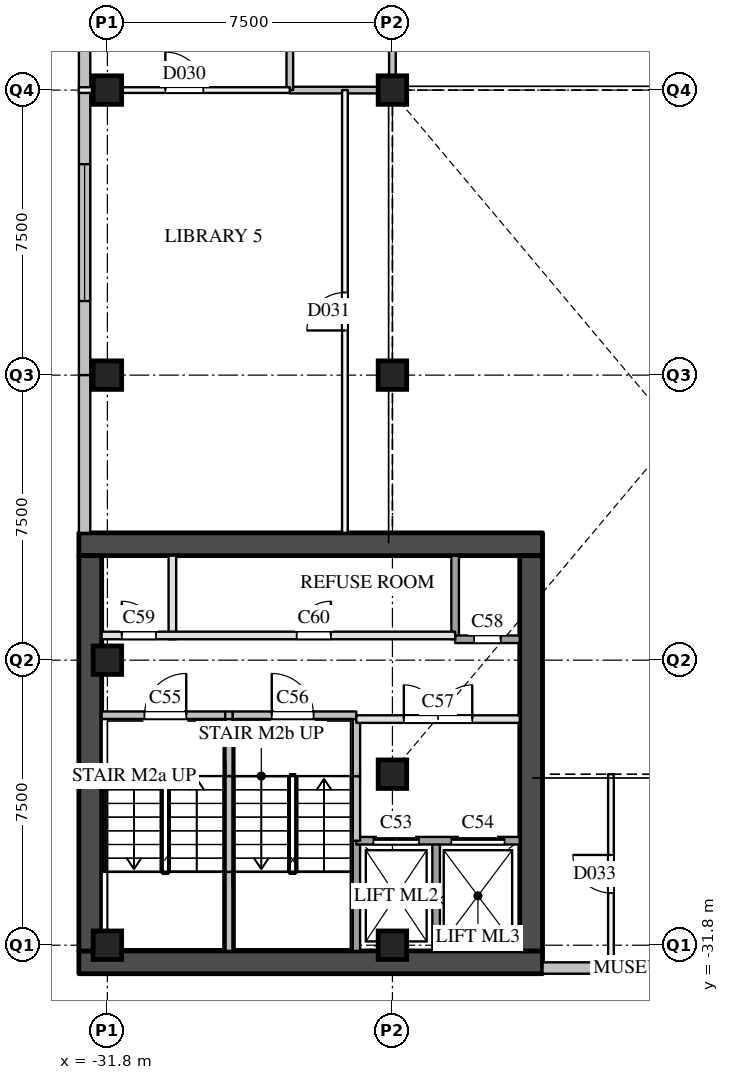
"""IFC4 building model, lengths in metres.
Left out: names, types, materials, properties, quantities, classifications, styles, units other than length and angle.
Written with IfcOpenShell. Run it as: python <this file> out.ifc"""

import sys

from ifc_helpers import new_model, si_unit, direction, frame, frame_2d, origin, origin_2d, place, context, subcontext, project, spatial, rectangle, extrude, element, fill, save


model = new_model("IFC4")
c1 = context("Model", 3, precision=1e-05, world=origin(), true_north=direction((0.0, 1.0)))
c2 = subcontext(c1, "Body", "Model", "MODEL_VIEW")
j1 = project(units=[si_unit("LENGTHUNIT", "METRE"), si_unit("PLANEANGLEUNIT", "RADIAN")], contexts=[c1])
p1 = place(None, origin())
s1 = spatial("IfcSite", under=j1, at=p1, CompositionType="ELEMENT")
p2 = place(p1, origin())
s2 = spatial("IfcBuilding", under=s1, at=p2, CompositionType="ELEMENT")
p3 = place(p2, frame((0.0, 0.0, 21.0)))
s3 = spatial("IfcBuildingStorey", under=s2, at=p3, CompositionType="ELEMENT", Elevation=21.0)
for number, where, z_axis, x_axis in (
    (1, (-31.8, -31.8, 0.0), (0.0, 0.0, 1.0), (1.0, 0.0, 0.0)),
    (2, (-31.8, -24.3, 0.0), (0.0, 0.0, 1.0), (1.0, 0.0, 0.0)),
    (3, (-31.8, -16.8, 0.0), (0.0, 0.0, 1.0), (1.0, 0.0, 0.0)),
    (4, (-31.8, -9.3, 0.0), (0.0, 0.0, 1.0), (1.0, 0.0, 0.0)),
    (5, (-24.3, -31.8, 0.0), (0.0, 0.0, 1.0), (1.0, 0.0, 0.0)),
    (6, (-24.3, -16.8, 0.0), (0.0, 0.0, 1.0), (1.0, 0.0, 0.0)),
    (7, (-24.3, -9.3, 0.0), (0.0, 0.0, 1.0), (1.0, 0.0, 0.0)),
    (8, (-24.3, -27.3, 0.0), (0.0, 0.0, 1.0), (1.0, 0.0, 0.0)),
):
    element("IfcColumn", number, at=place(p3, frame(where, z_axis=z_axis, x_axis=x_axis)), inside=s3, PredefinedType="COLUMN", context=c2, shape_type="SweptSolid", body=[
        extrude(rectangle(XDim=0.75, YDim=0.75, at=origin_2d()), origin(), (0.0, 0.0, 1.0), 5.0),
    ])
p4 = place(p3, frame((-20.35, -32.4, 0.0), z_axis=(0.0, 0.0, 1.0), x_axis=(1.0, 0.0, 0.0)))
e9 = element("IfcWall", 9, at=p4, inside=s3, PredefinedType="SOLIDWALL", context=c2, shape_type="SweptSolid", body=[
    extrude(rectangle(XDim=3.55, YDim=0.3, at=frame_2d((1.775, 0.0))), origin(), (0.0, 0.0, 1.0), 4.59),
])
p5 = place(p3, frame((-32.4, -1.8, 0.0), z_axis=(0.0, 0.0, 1.0), x_axis=(0.0, -1.0, 0.0)))
e10 = element("IfcWall", 10, at=p5, inside=s3, PredefinedType="SOLIDWALL", context=c2, shape_type="SweptSolid", body=[
    extrude(rectangle(XDim=7.5, YDim=0.3, at=frame_2d((3.75, 0.0))), origin(), (0.0, 0.0, 1.0), 4.59),
])
p6 = place(p5, frame((1.95, 0.0, 2.4)))
e11 = element("IfcOpeningElement", 11, at=p6, cuts=e10, PredefinedType="OPENING", context=c2, shape_type="SweptSolid", body=[
    extrude(rectangle(XDim=3.6, YDim=1.2, at=frame_2d((1.8, 0.6))), frame((0.0, 0.16, 0.0), z_axis=(0.0, -1.0, 0.0), x_axis=(1.0, 0.0, 0.0)), (0.0, 0.0, 1.0), 0.32),
])
p7 = place(p3, frame((-32.4, -9.3, 0.0), z_axis=(0.0, 0.0, 1.0), x_axis=(0.0, -1.0, 0.0)))
e12 = element("IfcWall", 12, at=p7, inside=s3, PredefinedType="SOLIDWALL", context=c2, shape_type="SweptSolid", body=[
    extrude(rectangle(XDim=7.5, YDim=0.3, at=frame_2d((3.75, 0.0))), origin(), (0.0, 0.0, 1.0), 4.59),
])
p8 = place(p7, frame((1.95, 0.0, 2.4)))
e13 = element("IfcOpeningElement", 13, at=p8, cuts=e12, PredefinedType="OPENING", context=c2, shape_type="SweptSolid", body=[
    extrude(rectangle(XDim=3.6, YDim=1.2, at=frame_2d((1.8, 0.6))), frame((0.0, 0.16, 0.0), z_axis=(0.0, -1.0, 0.0), x_axis=(1.0, 0.0, 0.0)), (0.0, 0.0, 1.0), 0.32),
])
p9 = place(p3, frame((-32.4, -16.8, 0.0), z_axis=(0.0, 0.0, 1.0), x_axis=(0.0, -1.0, 0.0)))
e14 = element("IfcWall", 14, at=p9, inside=s3, PredefinedType="SOLIDWALL", context=c2, shape_type="SweptSolid", body=[
    extrude(rectangle(XDim=4.15, YDim=0.3, at=frame_2d((2.075, 0.0))), origin(), (0.0, 0.0, 1.0), 4.59),
])
for number, where, z_axis, x_axis in (
    (15, (-32.55, -32.25, 0.0), (0.0, 0.0, 1.0), (1.0, 0.0, 0.0)),
    (16, (-32.55, -21.25, 0.0), (0.0, 0.0, 1.0), (1.0, 0.0, 0.0)),
):
    element("IfcWall", number, at=place(p3, frame(where, z_axis=z_axis, x_axis=x_axis)), inside=s3, PredefinedType="SHEAR", context=c2, shape_type="SweptSolid", body=[
        extrude(rectangle(XDim=12.2, YDim=0.6, at=frame_2d((6.1, 0.0))), origin(), (0.0, 0.0, 1.0), 4.55),
    ])
for number, where, z_axis, x_axis in (
    (17, (-32.25, -31.95, 0.0), (0.0, 0.0, 1.0), (0.0, 1.0, 0.0)),
    (18, (-20.65, -31.95, 0.0), (0.0, 0.0, 1.0), (0.0, 1.0, 0.0)),
):
    element("IfcWall", number, at=place(p3, frame(where, z_axis=z_axis, x_axis=x_axis)), inside=s3, PredefinedType="SHEAR", context=c2, shape_type="SweptSolid", body=[
        extrude(rectangle(XDim=10.4, YDim=0.6, at=frame_2d((5.2, 0.0))), origin(), (0.0, 0.0, 1.0), 4.55),
    ])
p10 = place(p3, frame((-30.09, -23.75, 0.0), z_axis=(0.0, 0.0, 1.0), x_axis=(0.0, 1.0, 0.0)))
e19 = element("IfcWall", 19, at=p10, inside=s3, PredefinedType="PARTITIONING", context=c2, shape_type="SweptSolid", body=[
    extrude(rectangle(XDim=2.2, YDim=0.2, at=frame_2d((1.1, 0.0))), origin(), (0.0, 0.0, 1.0), 4.55),
])
p11 = place(p3, frame((-28.6, -31.95, 0.0), z_axis=(0.0, 0.0, 1.0), x_axis=(0.0, 1.0, 0.0)))
e20 = element("IfcWall", 20, at=p11, inside=s3, PredefinedType="SOLIDWALL", context=c2, shape_type="SweptSolid", body=[
    extrude(rectangle(XDim=2.08, YDim=0.2, at=frame_2d((1.04, 0.0))), origin(), (0.0, 0.0, 1.0), 4.55),
])
p12 = place(p3, frame((-28.6, -29.87, 0.0), z_axis=(0.0, 0.0, 1.0), x_axis=(0.0, 1.0, 0.0)))
e21 = element("IfcWall", 21, at=p12, inside=s3, PredefinedType="SOLIDWALL", context=c2, shape_type="SweptSolid", body=[
    extrude(rectangle(XDim=2.52, YDim=0.2, at=frame_2d((1.26, 0.0))), origin(), (0.0, 0.0, 1.0), 4.55),
])
p13 = place(p3, frame((-28.6, -27.35, 0.0), z_axis=(0.0, 0.0, 1.0), x_axis=(0.0, 1.0, 0.0)))
e22 = element("IfcWall", 22, at=p13, inside=s3, PredefinedType="SOLIDWALL", context=c2, shape_type="SweptSolid", body=[
    extrude(rectangle(XDim=1.6, YDim=0.2, at=frame_2d((0.8, 0.0))), origin(), (0.0, 0.0, 1.0), 4.55),
])
p14 = place(p3, frame((-25.25, -31.95, 0.0), z_axis=(0.0, 0.0, 1.0), x_axis=(0.0, 1.0, 0.0)))
e23 = element("IfcWall", 23, at=p14, inside=s3, PredefinedType="SOLIDWALL", context=c2, shape_type="SweptSolid", body=[
    extrude(rectangle(XDim=2.9, YDim=0.2, at=frame_2d((1.45, 0.0))), origin(), (0.0, 0.0, 1.0), 4.55),
])
p15 = place(p3, frame((-25.25, -29.05, 0.0), z_axis=(0.0, 0.0, 1.0), x_axis=(0.0, 1.0, 0.0)))
e24 = element("IfcWall", 24, at=p15, inside=s3, PredefinedType="SOLIDWALL", context=c2, shape_type="SweptSolid", body=[
    extrude(rectangle(XDim=1.7, YDim=0.2, at=frame_2d((0.85, 0.0))), origin(), (0.0, 0.0, 1.0), 4.55),
])
p16 = place(p3, frame((-25.25, -27.35, 0.0), z_axis=(0.0, 0.0, 1.0), x_axis=(0.0, 1.0, 0.0)))
e25 = element("IfcWall", 25, at=p16, inside=s3, PredefinedType="SOLIDWALL", context=c2, shape_type="SweptSolid", body=[
    extrude(rectangle(XDim=1.6, YDim=0.2, at=frame_2d((0.8, 0.0))), origin(), (0.0, 0.0, 1.0), 4.55),
])
p17 = place(p3, frame((-23.15, -31.95, 0.0), z_axis=(0.0, 0.0, 1.0), x_axis=(0.0, 1.0, 0.0)))
e26 = element("IfcWall", 26, at=p17, inside=s3, PredefinedType="SOLIDWALL", context=c2, shape_type="SweptSolid", body=[
    extrude(rectangle(XDim=2.9, YDim=0.2, at=frame_2d((1.45, 0.0))), origin(), (0.0, 0.0, 1.0), 4.55),
])
p18 = place(p3, frame((-22.65, -23.75, 0.0), z_axis=(0.0, 0.0, 1.0), x_axis=(0.0, 1.0, 0.0)))
e27 = element("IfcWall", 27, at=p18, inside=s3, PredefinedType="SOLIDWALL", context=c2, shape_type="SweptSolid", body=[
    extrude(rectangle(XDim=2.2, YDim=0.2, at=frame_2d((1.1, 0.0))), origin(), (0.0, 0.0, 1.0), 4.55),
])
p19 = place(p3, frame((-25.25, -29.05, 0.0), z_axis=(0.0, 0.0, 1.0), x_axis=(1.0, 0.0, 0.0)))
e28 = element("IfcWall", 28, at=p19, inside=s3, PredefinedType="SOLIDWALL", context=c2, shape_type="SweptSolid", body=[
    extrude(rectangle(XDim=4.3, YDim=0.2, at=frame_2d((2.15, 0.0))), origin(), (0.0, 0.0, 1.0), 4.55),
])
p20 = place(p19, frame((0.45, 0.0, 0.0)))
e29 = element("IfcOpeningElement", 29, at=p20, cuts=e28, PredefinedType="OPENING", context=c2, shape_type="SweptSolid", body=[
    extrude(rectangle(XDim=1.2, YDim=2.1, at=frame_2d((0.6, 1.05))), frame((0.0, 0.11, 0.0), z_axis=(0.0, -1.0, 0.0), x_axis=(1.0, 0.0, 0.0)), (0.0, 0.0, 1.0), 0.22),
])
p21 = place(p19, frame((2.5, 0.0, 0.0)))
e30 = element("IfcOpeningElement", 30, at=p21, cuts=e28, PredefinedType="OPENING", context=c2, shape_type="SweptSolid", body=[
    extrude(rectangle(XDim=1.4, YDim=2.1, at=frame_2d((0.7, 1.05))), frame((0.0, 0.11, 0.0), z_axis=(0.0, -1.0, 0.0), x_axis=(1.0, 0.0, 0.0)), (0.0, 0.0, 1.0), 0.22),
])
p22 = place(p3, frame((-25.25, -25.85, 0.0), z_axis=(0.0, 0.0, 1.0), x_axis=(1.0, 0.0, 0.0)))
e31 = element("IfcWall", 31, at=p22, inside=s3, PredefinedType="PARTITIONING", context=c2, shape_type="SweptSolid", body=[
    extrude(rectangle(XDim=4.3, YDim=0.2, at=frame_2d((2.15, 0.0))), origin(), (0.0, 0.0, 1.0), 4.55),
])
p23 = place(p22, frame((1.25, 0.0, 0.0)))
e32 = element("IfcOpeningElement", 32, at=p23, cuts=e31, PredefinedType="OPENING", context=c2, shape_type="SweptSolid", body=[
    extrude(rectangle(XDim=1.8, YDim=2.1, at=frame_2d((0.9, 1.05))), frame((0.0, 0.11, 0.0), z_axis=(0.0, -1.0, 0.0), x_axis=(1.0, 0.0, 0.0)), (0.0, 0.0, 1.0), 0.22),
])
p24 = place(p3, frame((-31.95, -25.75, 0.0), z_axis=(0.0, 0.0, 1.0), x_axis=(1.0, 0.0, 0.0)))
e33 = element("IfcWall", 33, at=p24, inside=s3, PredefinedType="SOLIDWALL", context=c2, shape_type="SweptSolid", body=[
    extrude(rectangle(XDim=3.25, YDim=0.2, at=frame_2d((1.625, 0.0))), origin(), (0.0, 0.0, 1.0), 4.55),
])
p25 = place(p24, frame((1.125, 0.0, 0.0)))
e34 = element("IfcOpeningElement", 34, at=p25, cuts=e33, PredefinedType="OPENING", context=c2, shape_type="SweptSolid", body=[
    extrude(rectangle(XDim=1.1, YDim=2.1, at=frame_2d((0.55, 1.05))), frame((0.0, 0.11, 0.0), z_axis=(0.0, -1.0, 0.0), x_axis=(1.0, 0.0, 0.0)), (0.0, 0.0, 1.0), 0.22),
])
p26 = place(p3, frame((-28.7, -25.75, 0.0), z_axis=(0.0, 0.0, 1.0), x_axis=(1.0, 0.0, 0.0)))
e35 = element("IfcWall", 35, at=p26, inside=s3, PredefinedType="SOLIDWALL", context=c2, shape_type="SweptSolid", body=[
    extrude(rectangle(XDim=0.2, YDim=0.2, at=frame_2d((0.1, 0.0))), origin(), (0.0, 0.0, 1.0), 4.55),
])
p27 = place(p3, frame((-28.5, -25.75, 0.0), z_axis=(0.0, 0.0, 1.0), x_axis=(1.0, 0.0, 0.0)))
e36 = element("IfcWall", 36, at=p27, inside=s3, PredefinedType="SOLIDWALL", context=c2, shape_type="SweptSolid", body=[
    extrude(rectangle(XDim=3.25, YDim=0.2, at=frame_2d((1.625, 0.0))), origin(), (0.0, 0.0, 1.0), 4.55),
])
p28 = place(p27, frame((1.025, 0.0, 0.0)))
e37 = element("IfcOpeningElement", 37, at=p28, cuts=e36, PredefinedType="OPENING", context=c2, shape_type="SweptSolid", body=[
    extrude(rectangle(XDim=1.1, YDim=2.1, at=frame_2d((0.55, 1.05))), frame((0.0, 0.11, 0.0), z_axis=(0.0, -1.0, 0.0), x_axis=(1.0, 0.0, 0.0)), (0.0, 0.0, 1.0), 0.22),
])
p29 = place(p3, frame((-31.95, -23.65, 0.0), z_axis=(0.0, 0.0, 1.0), x_axis=(1.0, 0.0, 0.0)))
e38 = element("IfcWall", 38, at=p29, inside=s3, PredefinedType="PARTITIONING", context=c2, shape_type="SweptSolid", body=[
    extrude(rectangle(XDim=9.3, YDim=0.2, at=frame_2d((4.65, 0.0))), origin(), (0.0, 0.0, 1.0), 4.55),
])
p30 = place(p29, frame((0.53, 0.0, 0.0)))
e39 = element("IfcOpeningElement", 39, at=p30, cuts=e38, PredefinedType="OPENING", context=c2, shape_type="SweptSolid", body=[
    extrude(rectangle(XDim=0.9, YDim=2.1, at=frame_2d((0.45, 1.05))), frame((0.0, 0.11, 0.0), z_axis=(0.0, -1.0, 0.0), x_axis=(1.0, 0.0, 0.0)), (0.0, 0.0, 1.0), 0.22),
])
p31 = place(p29, frame((5.13, 0.0, 0.0)))
e40 = element("IfcOpeningElement", 40, at=p31, cuts=e38, PredefinedType="OPENING", context=c2, shape_type="SweptSolid", body=[
    extrude(rectangle(XDim=0.9, YDim=2.1, at=frame_2d((0.45, 1.05))), frame((0.0, 0.11, 0.0), z_axis=(0.0, -1.0, 0.0), x_axis=(1.0, 0.0, 0.0)), (0.0, 0.0, 1.0), 0.22),
])
p32 = place(p3, frame((-22.65, -23.75, 0.0), z_axis=(0.0, 0.0, 1.0), x_axis=(1.0, 0.0, 0.0)))
e41 = element("IfcWall", 41, at=p32, inside=s3, PredefinedType="SOLIDWALL", context=c2, shape_type="SweptSolid", body=[
    extrude(rectangle(XDim=1.7, YDim=0.2, at=frame_2d((0.85, 0.0))), origin(), (0.0, 0.0, 1.0), 4.55),
])
p33 = place(p32, frame((0.5, 0.0, 0.0)))
e42 = element("IfcOpeningElement", 42, at=p33, cuts=e41, PredefinedType="OPENING", context=c2, shape_type="SweptSolid", body=[
    extrude(rectangle(XDim=0.7, YDim=2.1, at=frame_2d((0.35, 1.05))), frame((0.0, 0.11, 0.0), z_axis=(0.0, -1.0, 0.0), x_axis=(1.0, 0.0, 0.0)), (0.0, 0.0, 1.0), 0.22),
])
p34 = place(p3, frame((-27.0, -9.3, 0.0), z_axis=(0.0, 0.0, 1.0), x_axis=(1.0, 0.0, 0.0)))
e43 = element("IfcWall", 43, at=p34, inside=s3, PredefinedType="PARTITIONING", context=c2, shape_type="SweptSolid", body=[
    extrude(rectangle(XDim=2.7, YDim=0.175, at=frame_2d((1.35, 0.0))), origin(), (0.0, 0.0, 1.0), 3.79),
])
p35 = place(p3, frame((-27.0, -9.3, 0.0), z_axis=(0.0, 0.0, 1.0), x_axis=(0.0, 1.0, 0.0)))
e44 = element("IfcWall", 44, at=p35, inside=s3, PredefinedType="PARTITIONING", context=c2, shape_type="SweptSolid", body=[
    extrude(rectangle(XDim=6.0, YDim=0.175, at=frame_2d((3.0, 0.0))), origin(), (0.0, 0.0, 1.0), 3.79),
])
p36 = place(p35, frame((2.5, 0.0, 0.0)))
e45 = element("IfcOpeningElement", 45, at=p36, cuts=e44, PredefinedType="OPENING", context=c2, shape_type="SweptSolid", body=[
    extrude(rectangle(XDim=1.0, YDim=2.1, at=frame_2d((0.5, 1.05))), frame((0.0, 0.097, 0.0), z_axis=(0.0, -1.0, 0.0), x_axis=(1.0, 0.0, 0.0)), (0.0, 0.0, 1.0), 0.195),
])
p37 = place(p3, frame((-24.3, -9.3, 0.0), z_axis=(0.0, 0.0, 1.0), x_axis=(0.0, 1.0, 0.0)))
e46 = element("IfcWall", 46, at=p37, inside=s3, PredefinedType="PARTITIONING", context=c2, shape_type="SweptSolid", body=[
    extrude(rectangle(XDim=21.3, YDim=0.175, at=frame_2d((10.65, 0.0))), origin(), (0.0, 0.0, 1.0), 3.79),
])
p38 = place(p37, frame((2.5, 0.0, 0.0)))
e47 = element("IfcOpeningElement", 47, at=p38, cuts=e46, PredefinedType="OPENING", context=c2, shape_type="SweptSolid", body=[
    extrude(rectangle(XDim=1.0, YDim=2.1, at=frame_2d((0.5, 1.05))), frame((0.0, 0.097, 0.0), z_axis=(0.0, -1.0, 0.0), x_axis=(1.0, 0.0, 0.0)), (0.0, 0.0, 1.0), 0.195),
])
p39 = place(p37, frame((16.3, 0.0, 0.0)))
e48 = element("IfcOpeningElement", 48, at=p39, cuts=e46, PredefinedType="OPENING", context=c2, shape_type="SweptSolid", body=[
    extrude(rectangle(XDim=1.0, YDim=2.1, at=frame_2d((0.5, 1.05))), frame((0.0, 0.097, 0.0), z_axis=(0.0, -1.0, 0.0), x_axis=(1.0, 0.0, 0.0)), (0.0, 0.0, 1.0), 0.195),
])
p40 = place(p3, frame((-32.55, -9.3, 0.0), z_axis=(0.0, 0.0, 1.0), x_axis=(1.0, 0.0, 0.0)))
e49 = element("IfcWall", 49, at=p40, inside=s3, PredefinedType="PARTITIONING", context=c2, shape_type="SweptSolid", body=[
    extrude(rectangle(XDim=5.55, YDim=0.15, at=frame_2d((2.775, 0.0))), origin(), (0.0, 0.0, 1.0), 3.79),
])
p41 = place(p40, frame((2.275, 0.0, 0.0)))
e50 = element("IfcOpeningElement", 50, at=p41, cuts=e49, PredefinedType="OPENING", context=c2, shape_type="SweptSolid", body=[
    extrude(rectangle(XDim=1.0, YDim=2.1, at=frame_2d((0.5, 1.05))), frame((0.0, 0.085, 0.0), z_axis=(0.0, -1.0, 0.0), x_axis=(1.0, 0.0, 0.0)), (0.0, 0.0, 1.0), 0.17),
])
p42 = place(p3, frame((-25.55, -20.95, 0.0), z_axis=(0.0, 0.0, 1.0), x_axis=(0.0, 1.0, 0.0)))
e51 = element("IfcWall", 51, at=p42, inside=s3, PredefinedType="PARTITIONING", context=c2, shape_type="SweptSolid", body=[
    extrude(rectangle(XDim=11.65, YDim=0.15, at=frame_2d((5.825, 0.0))), origin(), (0.0, 0.0, 1.0), 3.79),
])
p43 = place(p42, frame((5.325, 0.0, 0.0)))
e52 = element("IfcOpeningElement", 52, at=p43, cuts=e51, PredefinedType="OPENING", context=c2, shape_type="SweptSolid", body=[
    extrude(rectangle(XDim=1.0, YDim=2.1, at=frame_2d((0.5, 1.05))), frame((0.0, 0.085, 0.0), z_axis=(0.0, -1.0, 0.0), x_axis=(1.0, 0.0, 0.0)), (0.0, 0.0, 1.0), 0.17),
])
p44 = place(p3, frame((-18.55, -32.55, 0.0), z_axis=(0.0, 0.0, 1.0), x_axis=(0.0, 1.0, 0.0)))
e53 = element("IfcWall", 53, at=p44, inside=s3, PredefinedType="PARTITIONING", context=c2, shape_type="SweptSolid", body=[
    extrude(rectangle(XDim=5.25, YDim=0.15, at=frame_2d((2.625, 0.0))), origin(), (0.0, 0.0, 1.0), 4.55),
])
p45 = place(p44, frame((2.125, 0.0, 0.0)))
e54 = element("IfcOpeningElement", 54, at=p45, cuts=e53, PredefinedType="OPENING", context=c2, shape_type="SweptSolid", body=[
    extrude(rectangle(XDim=1.0, YDim=2.1, at=frame_2d((0.5, 1.05))), frame((0.0, 0.085, 0.0), z_axis=(0.0, -1.0, 0.0), x_axis=(1.0, 0.0, 0.0)), (0.0, 0.0, 1.0), 0.17),
])
p46 = place(p8, origin())
e55 = element("IfcWindow", 55, at=p46, inside=s3, PartitioningType="SINGLE_PANEL", PredefinedType="WINDOW", context=c2, shape_type="SweptSolid", body=[
    extrude(rectangle(XDim=3.6, YDim=1.2, at=frame_2d((1.8, 0.6))), frame((0.0, 0.03, 0.0), z_axis=(0.0, -1.0, 0.0), x_axis=(1.0, 0.0, 0.0)), (0.0, 0.0, 1.0), 0.06),
])
fill(e13, e55)
p47 = place(p20, origin())
e56 = element("IfcDoor", 56, at=p47, inside=s3, OperationType="SLIDING_TO_LEFT", PredefinedType="DOOR", context=c2, shape_type="SweptSolid", body=[
    extrude(rectangle(XDim=1.2, YDim=2.1, at=frame_2d((0.6, 1.05))), frame((0.0, 0.025, 0.0), z_axis=(0.0, -1.0, 0.0), x_axis=(1.0, 0.0, 0.0)), (0.0, 0.0, 1.0), 0.05),
])
fill(e29, e56)
p48 = place(p21, origin())
e57 = element("IfcDoor", 57, at=p48, inside=s3, OperationType="SLIDING_TO_LEFT", PredefinedType="DOOR", context=c2, shape_type="SweptSolid", body=[
    extrude(rectangle(XDim=1.4, YDim=2.1, at=frame_2d((0.7, 1.05))), frame((0.0, 0.025, 0.0), z_axis=(0.0, -1.0, 0.0), x_axis=(1.0, 0.0, 0.0)), (0.0, 0.0, 1.0), 0.05),
])
fill(e30, e57)
p49 = place(p25, origin())
e58 = element("IfcDoor", 58, at=p49, inside=s3, OperationType="SINGLE_SWING_RIGHT", PredefinedType="DOOR", context=c2, shape_type="SweptSolid", body=[
    extrude(rectangle(XDim=1.1, YDim=2.1, at=frame_2d((0.55, 1.05))), frame((0.0, 0.025, 0.0), z_axis=(0.0, -1.0, 0.0), x_axis=(1.0, 0.0, 0.0)), (0.0, 0.0, 1.0), 0.05),
])
fill(e34, e58)
p50 = place(p28, origin())
e59 = element("IfcDoor", 59, at=p50, inside=s3, OperationType="SINGLE_SWING_LEFT", PredefinedType="DOOR", context=c2, shape_type="SweptSolid", body=[
    extrude(rectangle(XDim=1.1, YDim=2.1, at=frame_2d((0.55, 1.05))), frame((0.0, 0.025, 0.0), z_axis=(0.0, -1.0, 0.0), x_axis=(1.0, 0.0, 0.0)), (0.0, 0.0, 1.0), 0.05),
])
fill(e37, e59)
p51 = place(p23, origin())
e60 = element("IfcDoor", 60, at=p51, inside=s3, OperationType="DOUBLE_DOOR_SINGLE_SWING", PredefinedType="DOOR", context=c2, shape_type="SweptSolid", body=[
    extrude(rectangle(XDim=1.8, YDim=2.1, at=frame_2d((0.9, 1.05))), frame((0.0, 0.025, 0.0), z_axis=(0.0, -1.0, 0.0), x_axis=(1.0, 0.0, 0.0)), (0.0, 0.0, 1.0), 0.05),
])
fill(e32, e60)
p52 = place(p33, origin())
e61 = element("IfcDoor", 61, at=p52, inside=s3, OperationType="SINGLE_SWING_RIGHT", PredefinedType="DOOR", context=c2, shape_type="SweptSolid", body=[
    extrude(rectangle(XDim=0.7, YDim=2.1, at=frame_2d((0.35, 1.05))), frame((0.0, 0.025, 0.0), z_axis=(0.0, -1.0, 0.0), x_axis=(1.0, 0.0, 0.0)), (0.0, 0.0, 1.0), 0.05),
])
fill(e42, e61)
p53 = place(p30, origin())
e62 = element("IfcDoor", 62, at=p53, inside=s3, OperationType="SINGLE_SWING_LEFT", PredefinedType="DOOR", context=c2, shape_type="SweptSolid", body=[
    extrude(rectangle(XDim=0.9, YDim=2.1, at=frame_2d((0.45, 1.05))), frame((0.0, 0.025, 0.0), z_axis=(0.0, -1.0, 0.0), x_axis=(1.0, 0.0, 0.0)), (0.0, 0.0, 1.0), 0.05),
])
fill(e39, e62)
p54 = place(p31, origin())
e63 = element("IfcDoor", 63, at=p54, inside=s3, OperationType="SINGLE_SWING_RIGHT", PredefinedType="DOOR", context=c2, shape_type="SweptSolid", body=[
    extrude(rectangle(XDim=0.9, YDim=2.1, at=frame_2d((0.45, 1.05))), frame((0.0, 0.025, 0.0), z_axis=(0.0, -1.0, 0.0), x_axis=(1.0, 0.0, 0.0)), (0.0, 0.0, 1.0), 0.05),
])
fill(e40, e63)
p55 = place(p41, origin())
e64 = element("IfcDoor", 64, at=p55, inside=s3, OperationType="SINGLE_SWING_LEFT", PredefinedType="DOOR", context=c2, shape_type="SweptSolid", body=[
    extrude(rectangle(XDim=1.0, YDim=2.1, at=frame_2d((0.5, 1.05))), frame((0.0, 0.025, 0.0), z_axis=(0.0, -1.0, 0.0), x_axis=(1.0, 0.0, 0.0)), (0.0, 0.0, 1.0), 0.05),
])
fill(e50, e64)
p56 = place(p43, origin())
e65 = element("IfcDoor", 65, at=p56, inside=s3, OperationType="SINGLE_SWING_LEFT", PredefinedType="DOOR", context=c2, shape_type="SweptSolid", body=[
    extrude(rectangle(XDim=1.0, YDim=2.1, at=frame_2d((0.5, 1.05))), frame((0.0, 0.025, 0.0), z_axis=(0.0, -1.0, 0.0), x_axis=(1.0, 0.0, 0.0)), (0.0, 0.0, 1.0), 0.05),
])
fill(e52, e65)
p57 = place(p45, origin())
e66 = element("IfcDoor", 66, at=p57, inside=s3, OperationType="SINGLE_SWING_RIGHT", PredefinedType="DOOR", context=c2, shape_type="SweptSolid", body=[
    extrude(rectangle(XDim=1.0, YDim=2.1, at=frame_2d((0.5, 1.05))), frame((0.0, 0.025, 0.0), z_axis=(0.0, -1.0, 0.0), x_axis=(1.0, 0.0, 0.0)), (0.0, 0.0, 1.0), 0.05),
])
fill(e54, e66)
save(model, sys.argv[1])
